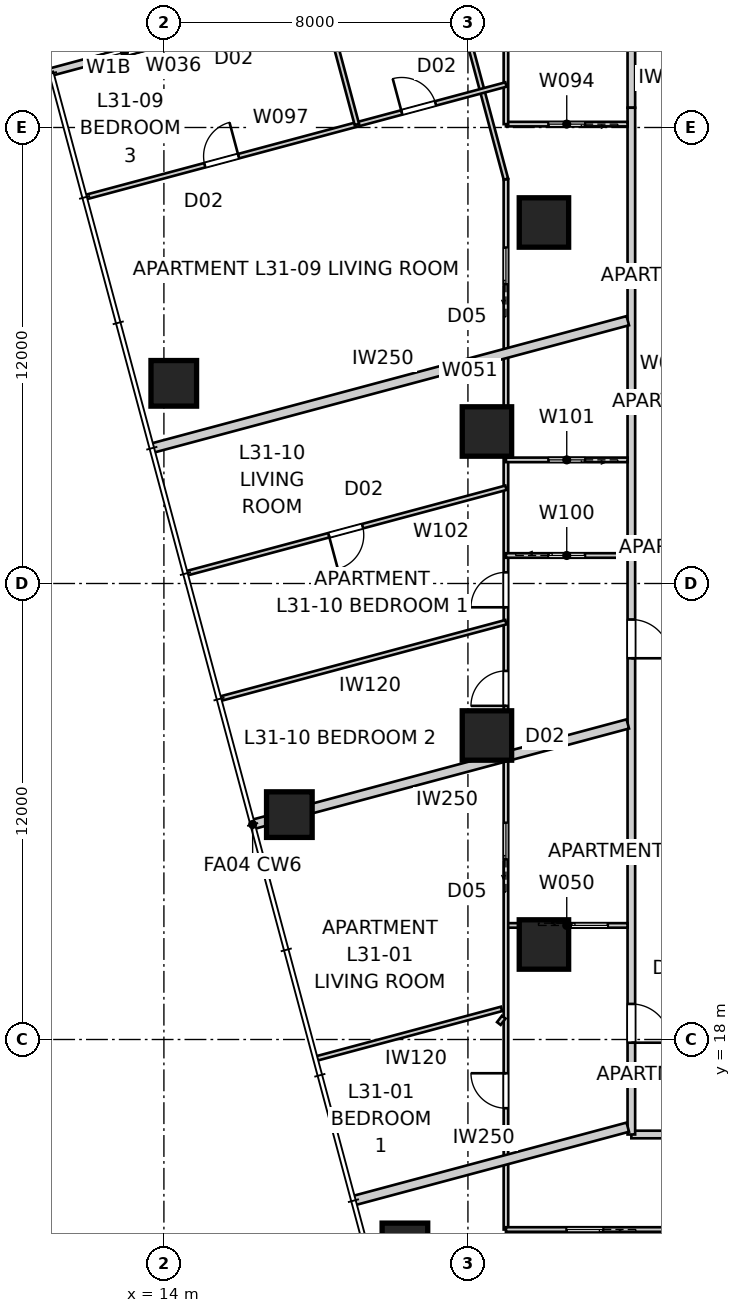
"""IFC4 building model, lengths in metres.
Left out: names, types, materials, properties, quantities, classifications, styles, units other than length and angle.
Written with IfcOpenShell. Run it as: python <this file> out.ifc"""

import sys

from ifc_helpers import new_model, si_unit, direction, frame, frame_2d, origin, origin_2d, place, context, subcontext, project, spatial, rectangle, extrude, element, fill, save


model = new_model("IFC4")
c1 = context("Model", 3, precision=1e-05, world=origin(), true_north=direction((0.0, 1.0)))
c2 = subcontext(c1, "Body", "Model", "MODEL_VIEW")
j1 = project(units=[si_unit("LENGTHUNIT", "METRE"), si_unit("PLANEANGLEUNIT", "RADIAN")], contexts=[c1])
p1 = place(None, origin())
s1 = spatial("IfcSite", under=j1, at=p1, CompositionType="ELEMENT")
p2 = place(p1, origin())
s2 = spatial("IfcBuilding", under=s1, at=p2, CompositionType="ELEMENT")
p3 = place(p2, frame((0.0, 0.0, 115.0)))
s3 = spatial("IfcBuildingStorey", under=s2, at=p3, CompositionType="ELEMENT", Elevation=115.0)
for number, where, z_axis, x_axis in (
    (1, (14.26, 35.267, 0.0), (0.0, 0.0, 1.0), (1.0, 0.0, 0.0)),
    (2, (17.301, 23.918, 0.0), (0.0, 0.0, 1.0), (1.0, 0.0, 0.0)),
    (3, (20.342, 12.568, 0.0), (0.0, 0.0, 1.0), (1.0, 0.0, 0.0)),
):
    element("IfcColumn", number, at=place(p3, frame(where, z_axis=z_axis, x_axis=x_axis)), inside=s3, PredefinedType="COLUMN", context=c2, shape_type="SweptSolid", body=[
        extrude(rectangle(XDim=1.2, YDim=1.2, at=origin_2d()), origin(), (0.0, 0.0, 1.0), 3.4),
    ])
for number, where, z_axis, x_axis in (
    (4, (24.0, 39.5, 0.0), (0.0, 0.0, 1.0), (1.0, 0.0, 0.0)),
    (5, (22.5, 34.0, 0.0), (0.0, 0.0, 1.0), (1.0, 0.0, 0.0)),
    (6, (22.5, 26.0, 0.0), (0.0, 0.0, 1.0), (1.0, 0.0, 0.0)),
    (7, (24.0, 20.5, 0.0), (0.0, 0.0, 1.0), (1.0, 0.0, 0.0)),
):
    element("IfcColumn", number, at=place(p3, frame(where, z_axis=z_axis, x_axis=x_axis)), inside=s3, PredefinedType="COLUMN", context=c2, shape_type="SweptSolid", body=[
        extrude(rectangle(XDim=1.3, YDim=1.3, at=origin_2d()), origin(), (0.0, 0.0, 1.0), 3.4),
    ])
p4 = place(p3, frame((14.893, 44.496, 0.0), z_axis=(0.0, 0.0, 1.0), x_axis=(-0.965934430412, -0.258786931944, 0.0)))
e8 = element("IfcWall", 8, at=p4, inside=s3, PredefinedType="SOLIDWALL", context=c2, shape_type="SweptSolid", body=[
    extrude(rectangle(XDim=4.0, YDim=0.2, at=frame_2d((2.0, 0.0))), origin(), (0.0, 0.0, 1.0), 3.25),
])
p5 = place(p4, frame((1.0, 0.0, 0.45)))
e9 = element("IfcOpeningElement", 9, at=p5, cuts=e8, PredefinedType="OPENING", context=c2, shape_type="SweptSolid", body=[
    extrude(rectangle(XDim=2.0, YDim=1.8, at=frame_2d((1.0, 0.9))), frame((0.0, 0.11, 0.0), z_axis=(0.0, -1.0, 0.0), x_axis=(1.0, 0.0, 0.0)), (0.0, 0.0, 1.0), 0.22),
])
p6 = place(p3, frame((26.3, 15.5, 0.0), z_axis=(0.0, 0.0, 1.0), x_axis=(1.0, 0.0, 0.0)))
e10 = element("IfcWall", 10, at=p6, inside=s3, PredefinedType="PARTITIONING", context=c2, shape_type="SweptSolid", body=[
    extrude(rectangle(XDim=28.2, YDim=0.2, at=frame_2d((14.1, 0.0))), origin(), (0.0, 0.0, 1.0), 3.25),
])
p7 = place(p6, frame((21.474, 0.0, 0.0)))
e11 = element("IfcOpeningElement", 11, at=p7, cuts=e10, PredefinedType="OPENING", context=c2, shape_type="SweptSolid", body=[
    extrude(rectangle(XDim=1.02, YDim=2.34, at=frame_2d((0.51, 1.17))), frame((0.0, 0.11, 0.0), z_axis=(0.0, -1.0, 0.0), x_axis=(1.0, 0.0, 0.0)), (0.0, 0.0, 1.0), 0.22),
])
p8 = place(p6, frame((1.353, 0.0, 0.0)))
e12 = element("IfcOpeningElement", 12, at=p8, cuts=e10, PredefinedType="OPENING", context=c2, shape_type="SweptSolid", body=[
    extrude(rectangle(XDim=1.02, YDim=2.1, at=frame_2d((0.51, 1.05))), frame((0.0, 0.11, 0.0), z_axis=(0.0, -1.0, 0.0), x_axis=(1.0, 0.0, 0.0)), (0.0, 0.0, 1.0), 0.22),
])
p9 = place(p3, frame((26.3, 44.074, 0.0), z_axis=(0.0, 0.0, 1.0), x_axis=(0.0, -1.0, 0.0)))
e13 = element("IfcWall", 13, at=p9, inside=s3, PredefinedType="PARTITIONING", context=c2, shape_type="SweptSolid", body=[
    extrude(rectangle(XDim=1.554, YDim=0.2, at=frame_2d((0.777, 0.0))), origin(), (0.0, 0.0, 1.0), 2.722),
])
p10 = place(p3, frame((26.3, 42.52, 0.0), z_axis=(0.0, 0.0, 1.0), x_axis=(0.0, -1.0, 0.0)))
e14 = element("IfcWall", 14, at=p10, inside=s3, PredefinedType="PARTITIONING", context=c2, shape_type="SweptSolid", body=[
    extrude(rectangle(XDim=27.02, YDim=0.2, at=frame_2d((13.51, 0.0))), origin(), (0.0, 0.0, 1.0), 3.25),
])
p11 = place(p10, frame((23.584, 0.0, 0.0)))
e15 = element("IfcOpeningElement", 15, at=p11, cuts=e14, PredefinedType="OPENING", context=c2, shape_type="SweptSolid", body=[
    extrude(rectangle(XDim=1.02, YDim=2.1, at=frame_2d((0.51, 1.05))), frame((0.0, 0.11, 0.0), z_axis=(0.0, -1.0, 0.0), x_axis=(1.0, 0.0, 0.0)), (0.0, 0.0, 1.0), 0.22),
])
p12 = place(p10, frame((13.468, 0.0, 0.0)))
e16 = element("IfcOpeningElement", 16, at=p12, cuts=e14, PredefinedType="OPENING", context=c2, shape_type="SweptSolid", body=[
    extrude(rectangle(XDim=1.02, YDim=2.34, at=frame_2d((0.51, 1.17))), frame((0.0, 0.11, 0.0), z_axis=(0.0, -1.0, 0.0), x_axis=(1.0, 0.0, 0.0)), (0.0, 0.0, 1.0), 0.22),
])
p13 = place(p3, frame((16.335, 23.659, 0.0), z_axis=(0.0, 0.0, 1.0), x_axis=(0.965927365002, 0.258813302479, 0.0)))
e17 = element("IfcWall", 17, at=p13, inside=s3, PredefinedType="PARTITIONING", context=c2, shape_type="SweptSolid", body=[
    extrude(rectangle(XDim=10.22, YDim=0.25, at=frame_2d((5.11, 0.0))), origin(), (0.0, 0.0, 1.0), 3.25),
])
p14 = place(p3, frame((13.682, 33.56, 0.0), z_axis=(0.0, 0.0, 1.0), x_axis=(0.965924854576, 0.258822671559, 0.0)))
e18 = element("IfcWall", 18, at=p14, inside=s3, PredefinedType="PARTITIONING", context=c2, shape_type="SweptSolid", body=[
    extrude(rectangle(XDim=12.966, YDim=0.25, at=frame_2d((6.483, 0.0))), origin(), (0.0, 0.0, 1.0), 3.25),
])
p15 = place(p3, frame((18.988, 13.758, 0.0), z_axis=(0.0, 0.0, 1.0), x_axis=(0.965929532284, 0.258805213744, 0.0)))
e19 = element("IfcWall", 19, at=p15, inside=s3, PredefinedType="PARTITIONING", context=c2, shape_type="SweptSolid", body=[
    extrude(rectangle(XDim=7.473, YDim=0.25, at=frame_2d((3.737, 0.0))), origin(), (0.0, 0.0, 1.0), 3.25),
])
p16 = place(p3, frame((23.0, 21.002, 0.0), z_axis=(0.0, 0.0, 1.0), x_axis=(1.0, 0.0, 0.0)))
e20 = element("IfcWall", 20, at=p16, inside=s3, PredefinedType="PARTITIONING", context=c2, shape_type="SweptSolid", body=[
    extrude(rectangle(XDim=3.2, YDim=0.12, at=frame_2d((1.6, 0.0))), origin(), (0.0, 0.0, 1.0), 3.25),
])
p17 = place(p16, frame((1.72, 0.0, 0.0)))
e21 = element("IfcOpeningElement", 21, at=p17, cuts=e20, PredefinedType="OPENING", context=c2, shape_type="SweptSolid", body=[
    extrude(rectangle(XDim=0.96, YDim=2.1, at=frame_2d((0.48, 1.05))), frame((0.0, 0.07, 0.0), z_axis=(0.0, -1.0, 0.0), x_axis=(1.0, 0.0, 0.0)), (0.0, 0.0, 1.0), 0.14),
])
p18 = place(p3, frame((23.0, 13.0, 0.0), z_axis=(0.0, 0.0, 1.0), x_axis=(0.0, 1.0, 0.0)))
e22 = element("IfcWall", 22, at=p18, inside=s3, PredefinedType="PARTITIONING", context=c2, shape_type="SweptSolid", body=[
    extrude(rectangle(XDim=27.64, YDim=0.12, at=frame_2d((13.82, 0.0))), origin(), (0.0, 0.0, 1.0), 2.55),
])
p19 = place(p18, frame((3.192, 0.0, 0.0)))
e23 = element("IfcOpeningElement", 23, at=p19, cuts=e22, PredefinedType="OPENING", context=c2, shape_type="SweptSolid", body=[
    extrude(rectangle(XDim=0.92, YDim=2.34, at=frame_2d((0.46, 1.17))), frame((0.0, 0.07, 0.0), z_axis=(0.0, -1.0, 0.0), x_axis=(1.0, 0.0, 0.0)), (0.0, 0.0, 1.0), 0.14),
])
p20 = place(p18, frame((13.779, 0.0, 0.0)))
e24 = element("IfcOpeningElement", 24, at=p20, cuts=e22, PredefinedType="OPENING", context=c2, shape_type="SweptSolid", body=[
    extrude(rectangle(XDim=0.92, YDim=2.34, at=frame_2d((0.46, 1.17))), frame((0.0, 0.07, 0.0), z_axis=(0.0, -1.0, 0.0), x_axis=(1.0, 0.0, 0.0)), (0.0, 0.0, 1.0), 0.14),
])
p21 = place(p18, frame((16.374, 0.0, 0.0)))
e25 = element("IfcOpeningElement", 25, at=p21, cuts=e22, PredefinedType="OPENING", context=c2, shape_type="SweptSolid", body=[
    extrude(rectangle(XDim=0.92, YDim=2.34, at=frame_2d((0.46, 1.17))), frame((0.0, 0.07, 0.0), z_axis=(0.0, -1.0, 0.0), x_axis=(1.0, 0.0, 0.0)), (0.0, 0.0, 1.0), 0.14),
])
p22 = place(p18, frame((9.743, 0.0, 0.0)))
e26 = element("IfcOpeningElement", 26, at=p22, cuts=e22, PredefinedType="OPENING", context=c2, shape_type="SweptSolid", body=[
    extrude(rectangle(XDim=0.96, YDim=2.1, at=frame_2d((0.48, 1.05))), frame((0.0, 0.07, 0.0), z_axis=(0.0, -1.0, 0.0), x_axis=(1.0, 0.0, 0.0)), (0.0, 0.0, 1.0), 0.14),
])
p23 = place(p18, frame((24.879, 0.0, 0.0)))
e27 = element("IfcOpeningElement", 27, at=p23, cuts=e22, PredefinedType="OPENING", context=c2, shape_type="SweptSolid", body=[
    extrude(rectangle(XDim=0.96, YDim=2.1, at=frame_2d((0.48, 1.05))), frame((0.0, 0.07, 0.0), z_axis=(0.0, -1.0, 0.0), x_axis=(1.0, 0.0, 0.0)), (0.0, 0.0, 1.0), 0.14),
])
p24 = place(p3, frame((22.813, 18.42, 0.0), z_axis=(0.0, 0.0, 1.0), x_axis=(0.609039064162, 0.793140226142, 0.0)))
e28 = element("IfcWall", 28, at=p24, inside=s3, PredefinedType="PARTITIONING", context=c2, shape_type="SweptSolid", body=[
    extrude(rectangle(XDim=0.211, YDim=0.12, at=frame_2d((0.105, 0.0))), origin(), (0.0, 0.0, 1.0), 3.25),
])
p25 = place(p3, frame((22.884, 18.805, 0.0), z_axis=(0.0, 0.0, 1.0), x_axis=(-0.965921615375, -0.258834759935, 0.0)))
e29 = element("IfcWall", 29, at=p25, inside=s3, PredefinedType="PARTITIONING", context=c2, shape_type="SweptSolid", body=[
    extrude(rectangle(XDim=5.029, YDim=0.12, at=frame_2d((2.515, 0.0))), origin(), (0.0, 0.0, 1.0), 2.722),
])
p26 = place(p3, frame((29.147, 13.0, 0.0), z_axis=(0.0, 0.0, 1.0), x_axis=(-1.0, 0.0, 0.0)))
e30 = element("IfcWall", 30, at=p26, inside=s3, PredefinedType="PARTITIONING", context=c2, shape_type="SweptSolid", body=[
    extrude(rectangle(XDim=6.147, YDim=0.12, at=frame_2d((3.074, 0.0))), origin(), (0.0, 0.0, 1.0), 3.25),
])
p27 = place(p26, frame((3.591, 0.0, 0.0)))
e31 = element("IfcOpeningElement", 31, at=p27, cuts=e30, PredefinedType="OPENING", context=c2, shape_type="SweptSolid", body=[
    extrude(rectangle(XDim=0.96, YDim=2.1, at=frame_2d((0.48, 1.05))), frame((0.0, 0.07, 0.0), z_axis=(0.0, -1.0, 0.0), x_axis=(1.0, 0.0, 0.0)), (0.0, 0.0, 1.0), 0.14),
])
p28 = place(p3, frame((19.911, 10.468, 0.0), z_axis=(0.0, 0.0, 1.0), x_axis=(0.965927203676, 0.25881390457, 0.0)))
e32 = element("IfcWall", 32, at=p28, inside=s3, PredefinedType="PARTITIONING", context=c2, shape_type="SweptSolid", body=[
    extrude(rectangle(XDim=9.357, YDim=0.12, at=frame_2d((4.678, 0.0))), origin(), (0.0, 0.0, 1.0), 2.638),
])
p29 = place(p28, frame((4.391, 0.0, 0.0)))
e33 = element("IfcOpeningElement", 33, at=p29, cuts=e32, PredefinedType="OPENING", context=c2, shape_type="SweptSolid", body=[
    extrude(rectangle(XDim=0.96, YDim=2.1, at=frame_2d((0.48, 1.05))), frame((0.0, 0.07, 0.0), z_axis=(0.0, -1.0, 0.0), x_axis=(1.0, 0.0, 0.0)), (0.0, 0.0, 1.0), 0.14),
])
p30 = place(p3, frame((26.2, 42.089, 0.0), z_axis=(0.0, 0.0, 1.0), x_axis=(-1.0, 0.0, 0.0)))
e34 = element("IfcWall", 34, at=p30, inside=s3, PredefinedType="PARTITIONING", context=c2, shape_type="SweptSolid", body=[
    extrude(rectangle(XDim=3.2, YDim=0.12, at=frame_2d((1.6, 0.0))), origin(), (0.0, 0.0, 1.0), 3.25),
])
p31 = place(p30, frame((1.12, 0.0, 0.0)))
e35 = element("IfcOpeningElement", 35, at=p31, cuts=e34, PredefinedType="OPENING", context=c2, shape_type="SweptSolid", body=[
    extrude(rectangle(XDim=0.96, YDim=2.1, at=frame_2d((0.48, 1.05))), frame((0.0, 0.07, 0.0), z_axis=(0.0, -1.0, 0.0), x_axis=(1.0, 0.0, 0.0)), (0.0, 0.0, 1.0), 0.14),
])
p32 = place(p3, frame((23.0, 42.089, 0.0), z_axis=(0.0, 0.0, 1.0), x_axis=(0.0, 1.0, 0.0)))
e36 = element("IfcWall", 36, at=p32, inside=s3, PredefinedType="PARTITIONING", context=c2, shape_type="SweptSolid", body=[
    extrude(rectangle(XDim=4.911, YDim=0.12, at=frame_2d((2.456, 0.0))), origin(), (0.0, 0.0, 1.0), 3.25),
])
p33 = place(p3, frame((23.0, 40.64, 0.0), z_axis=(0.0, 0.0, 1.0), x_axis=(-0.258790139317, 0.965933571108, 0.0)))
e37 = element("IfcWall", 37, at=p33, inside=s3, PredefinedType="PARTITIONING", context=c2, shape_type="SweptSolid", body=[
    extrude(rectangle(XDim=9.783, YDim=0.12, at=frame_2d((4.892, 0.0))), origin(), (0.0, 0.0, 1.0), 2.638),
])
p34 = place(p3, frame((11.952, 40.17, 0.0), z_axis=(0.0, 0.0, 1.0), x_axis=(0.965923183761, 0.258828906952, 0.0)))
e38 = element("IfcWall", 38, at=p34, inside=s3, PredefinedType="PARTITIONING", context=c2, shape_type="SweptSolid", body=[
    extrude(rectangle(XDim=11.438, YDim=0.12, at=frame_2d((5.719, 0.0))), origin(), (0.0, 0.0, 1.0), 3.25),
])
p35 = place(p34, frame((3.233, 0.0, 0.0)))
e39 = element("IfcOpeningElement", 39, at=p35, cuts=e38, PredefinedType="OPENING", context=c2, shape_type="SweptSolid", body=[
    extrude(rectangle(XDim=0.92, YDim=2.34, at=frame_2d((0.46, 1.17))), frame((0.0, 0.07, 0.0), z_axis=(0.0, -1.0, 0.0), x_axis=(1.0, 0.0, 0.0)), (0.0, 0.0, 1.0), 0.14),
])
p36 = place(p34, frame((8.6, 0.0, 0.0)))
e40 = element("IfcOpeningElement", 40, at=p36, cuts=e38, PredefinedType="OPENING", context=c2, shape_type="SweptSolid", body=[
    extrude(rectangle(XDim=0.92, YDim=2.34, at=frame_2d((0.46, 1.17))), frame((0.0, 0.07, 0.0), z_axis=(0.0, -1.0, 0.0), x_axis=(1.0, 0.0, 0.0)), (0.0, 0.0, 1.0), 0.14),
])
p37 = place(p3, frame((19.077, 42.08, 0.0), z_axis=(0.0, 0.0, 1.0), x_axis=(-0.258846923464, 0.965918355874, 0.0)))
e41 = element("IfcWall", 41, at=p37, inside=s3, PredefinedType="PARTITIONING", context=c2, shape_type="SweptSolid", body=[
    extrude(rectangle(XDim=7.377, YDim=0.12, at=frame_2d((3.688, 0.0))), origin(), (0.0, 0.0, 1.0), 3.25),
])
p38 = place(p3, frame((23.0, 30.737, 0.0), z_axis=(0.0, 0.0, 1.0), x_axis=(1.0, 0.0, 0.0)))
e42 = element("IfcWall", 42, at=p38, inside=s3, PredefinedType="PARTITIONING", context=c2, shape_type="SweptSolid", body=[
    extrude(rectangle(XDim=3.2, YDim=0.12, at=frame_2d((1.6, 0.0))), origin(), (0.0, 0.0, 1.0), 3.25),
])
p39 = place(p38, frame((1.12, 0.0, 0.0)))
e43 = element("IfcOpeningElement", 43, at=p39, cuts=e42, PredefinedType="OPENING", context=c2, shape_type="SweptSolid", body=[
    extrude(rectangle(XDim=0.96, YDim=2.1, at=frame_2d((0.48, 1.05))), frame((0.0, 0.07, 0.0), z_axis=(0.0, -1.0, 0.0), x_axis=(1.0, 0.0, 0.0)), (0.0, 0.0, 1.0), 0.14),
])
p40 = place(p3, frame((26.2, 33.253, 0.0), z_axis=(0.0, 0.0, 1.0), x_axis=(-1.0, 0.0, 0.0)))
e44 = element("IfcWall", 44, at=p40, inside=s3, PredefinedType="PARTITIONING", context=c2, shape_type="SweptSolid", body=[
    extrude(rectangle(XDim=3.2, YDim=0.12, at=frame_2d((1.6, 0.0))), origin(), (0.0, 0.0, 1.0), 3.25),
])
p41 = place(p40, frame((1.12, 0.0, 0.0)))
e45 = element("IfcOpeningElement", 45, at=p41, cuts=e44, PredefinedType="OPENING", context=c2, shape_type="SweptSolid", body=[
    extrude(rectangle(XDim=0.96, YDim=2.1, at=frame_2d((0.48, 1.05))), frame((0.0, 0.07, 0.0), z_axis=(0.0, -1.0, 0.0), x_axis=(1.0, 0.0, 0.0)), (0.0, 0.0, 1.0), 0.14),
])
p42 = place(p3, frame((23.0, 32.519, 0.0), z_axis=(0.0, 0.0, 1.0), x_axis=(-0.965925607751, -0.258819860698, 0.0)))
e46 = element("IfcWall", 46, at=p42, inside=s3, PredefinedType="PARTITIONING", context=c2, shape_type="SweptSolid", body=[
    extrude(rectangle(XDim=8.691, YDim=0.12, at=frame_2d((4.346, 0.0))), origin(), (0.0, 0.0, 1.0), 3.25),
])
p43 = place(p42, frame((3.906, 0.0, 0.0)))
e47 = element("IfcOpeningElement", 47, at=p43, cuts=e46, PredefinedType="OPENING", context=c2, shape_type="SweptSolid", body=[
    extrude(rectangle(XDim=0.92, YDim=2.34, at=frame_2d((0.46, 1.17))), frame((0.0, 0.07, 0.0), z_axis=(0.0, -1.0, 0.0), x_axis=(1.0, 0.0, 0.0)), (0.0, 0.0, 1.0), 0.14),
])
p44 = place(p3, frame((23.0, 28.982, 0.0), z_axis=(0.0, 0.0, 1.0), x_axis=(-0.965927309482, -0.258813509689, 0.0)))
e48 = element("IfcWall", 48, at=p44, inside=s3, PredefinedType="PARTITIONING", context=c2, shape_type="SweptSolid", body=[
    extrude(rectangle(XDim=7.776, YDim=0.12, at=frame_2d((3.888, 0.0))), origin(), (0.0, 0.0, 1.0), 3.25),
])
p45 = place(p5, origin())
e49 = element("IfcWindow", 49, at=p45, inside=s3, PartitioningType="SINGLE_PANEL", PredefinedType="WINDOW", context=c2, shape_type="SweptSolid", body=[
    extrude(rectangle(XDim=2.0, YDim=1.8, at=frame_2d((1.0, 0.9))), frame((0.0, 0.03, 0.0), z_axis=(0.0, -1.0, 0.0), x_axis=(1.0, 0.0, 0.0)), (0.0, 0.0, 1.0), 0.06),
])
fill(e9, e49)
p46 = place(p11, origin())
e50 = element("IfcDoor", 50, at=p46, inside=s3, OperationType="SINGLE_SWING_RIGHT", PredefinedType="DOOR", context=c2, shape_type="SweptSolid", body=[
    extrude(rectangle(XDim=1.02, YDim=2.1, at=frame_2d((0.51, 1.05))), frame((0.0, 0.025, 0.0), z_axis=(0.0, -1.0, 0.0), x_axis=(1.0, 0.0, 0.0)), (0.0, 0.0, 1.0), 0.05),
])
fill(e15, e50)
p47 = place(p12, origin())
e51 = element("IfcDoor", 51, at=p47, inside=s3, OperationType="SINGLE_SWING_RIGHT", PredefinedType="DOOR", context=c2, shape_type="SweptSolid", body=[
    extrude(rectangle(XDim=1.02, YDim=2.34, at=frame_2d((0.51, 1.17))), frame((0.0, 0.025, 0.0), z_axis=(0.0, -1.0, 0.0), x_axis=(1.0, 0.0, 0.0)), (0.0, 0.0, 1.0), 0.05),
])
fill(e16, e51)
p48 = place(p19, origin())
e52 = element("IfcDoor", 52, at=p48, inside=s3, OperationType="SINGLE_SWING_RIGHT", PredefinedType="DOOR", context=c2, shape_type="SweptSolid", body=[
    extrude(rectangle(XDim=0.92, YDim=2.34, at=frame_2d((0.46, 1.17))), frame((0.0, 0.025, 0.0), z_axis=(0.0, -1.0, 0.0), x_axis=(1.0, 0.0, 0.0)), (0.0, 0.0, 1.0), 0.05),
])
fill(e23, e52)
p49 = place(p17, origin())
e53 = element("IfcDoor", 53, at=p49, inside=s3, OperationType="SLIDING_TO_LEFT", PredefinedType="DOOR", context=c2, shape_type="SweptSolid", body=[
    extrude(rectangle(XDim=0.96, YDim=2.1, at=frame_2d((0.48, 1.05))), frame((0.0, 0.025, 0.0), z_axis=(0.0, -1.0, 0.0), x_axis=(1.0, 0.0, 0.0)), (0.0, 0.0, 1.0), 0.05),
])
fill(e21, e53)
p50 = place(p20, origin())
e54 = element("IfcDoor", 54, at=p50, inside=s3, OperationType="SINGLE_SWING_LEFT", PredefinedType="DOOR", context=c2, shape_type="SweptSolid", body=[
    extrude(rectangle(XDim=0.92, YDim=2.34, at=frame_2d((0.46, 1.17))), frame((0.0, 0.025, 0.0), z_axis=(0.0, -1.0, 0.0), x_axis=(1.0, 0.0, 0.0)), (0.0, 0.0, 1.0), 0.05),
])
fill(e24, e54)
p51 = place(p39, origin())
e55 = element("IfcDoor", 55, at=p51, inside=s3, OperationType="SLIDING_TO_LEFT", PredefinedType="DOOR", context=c2, shape_type="SweptSolid", body=[
    extrude(rectangle(XDim=0.96, YDim=2.1, at=frame_2d((0.48, 1.05))), frame((0.0, 0.025, 0.0), z_axis=(0.0, -1.0, 0.0), x_axis=(1.0, 0.0, 0.0)), (0.0, 0.0, 1.0), 0.05),
])
fill(e43, e55)
p52 = place(p21, origin())
e56 = element("IfcDoor", 56, at=p52, inside=s3, OperationType="SINGLE_SWING_LEFT", PredefinedType="DOOR", context=c2, shape_type="SweptSolid", body=[
    extrude(rectangle(XDim=0.92, YDim=2.34, at=frame_2d((0.46, 1.17))), frame((0.0, 0.025, 0.0), z_axis=(0.0, -1.0, 0.0), x_axis=(1.0, 0.0, 0.0)), (0.0, 0.0, 1.0), 0.05),
])
fill(e25, e56)
p53 = place(p27, origin())
e57 = element("IfcDoor", 57, at=p53, inside=s3, OperationType="SLIDING_TO_LEFT", PredefinedType="DOOR", context=c2, shape_type="SweptSolid", body=[
    extrude(rectangle(XDim=0.96, YDim=2.1, at=frame_2d((0.48, 1.05))), frame((0.0, 0.025, 0.0), z_axis=(0.0, -1.0, 0.0), x_axis=(1.0, 0.0, 0.0)), (0.0, 0.0, 1.0), 0.05),
])
fill(e31, e57)
p54 = place(p31, origin())
e58 = element("IfcDoor", 58, at=p54, inside=s3, OperationType="SLIDING_TO_LEFT", PredefinedType="DOOR", context=c2, shape_type="SweptSolid", body=[
    extrude(rectangle(XDim=0.96, YDim=2.1, at=frame_2d((0.48, 1.05))), frame((0.0, 0.025, 0.0), z_axis=(0.0, -1.0, 0.0), x_axis=(1.0, 0.0, 0.0)), (0.0, 0.0, 1.0), 0.05),
])
fill(e35, e58)
p55 = place(p22, origin())
e59 = element("IfcDoor", 59, at=p55, inside=s3, OperationType="SLIDING_TO_LEFT", PredefinedType="DOOR", context=c2, shape_type="SweptSolid", body=[
    extrude(rectangle(XDim=0.96, YDim=2.1, at=frame_2d((0.48, 1.05))), frame((0.0, 0.025, 0.0), z_axis=(0.0, -1.0, 0.0), x_axis=(1.0, 0.0, 0.0)), (0.0, 0.0, 1.0), 0.05),
])
fill(e26, e59)
p56 = place(p41, origin())
e60 = element("IfcDoor", 60, at=p56, inside=s3, OperationType="SLIDING_TO_LEFT", PredefinedType="DOOR", context=c2, shape_type="SweptSolid", body=[
    extrude(rectangle(XDim=0.96, YDim=2.1, at=frame_2d((0.48, 1.05))), frame((0.0, 0.025, 0.0), z_axis=(0.0, -1.0, 0.0), x_axis=(1.0, 0.0, 0.0)), (0.0, 0.0, 1.0), 0.05),
])
fill(e45, e60)
p57 = place(p23, origin())
e61 = element("IfcDoor", 61, at=p57, inside=s3, OperationType="SLIDING_TO_LEFT", PredefinedType="DOOR", context=c2, shape_type="SweptSolid", body=[
    extrude(rectangle(XDim=0.96, YDim=2.1, at=frame_2d((0.48, 1.05))), frame((0.0, 0.025, 0.0), z_axis=(0.0, -1.0, 0.0), x_axis=(1.0, 0.0, 0.0)), (0.0, 0.0, 1.0), 0.05),
])
fill(e27, e61)
p58 = place(p35, origin())
e62 = element("IfcDoor", 62, at=p58, inside=s3, OperationType="SINGLE_SWING_RIGHT", PredefinedType="DOOR", context=c2, shape_type="SweptSolid", body=[
    extrude(rectangle(XDim=0.92, YDim=2.34, at=frame_2d((0.46, 1.17))), frame((0.0, 0.025, 0.0), z_axis=(0.0, -1.0, 0.0), x_axis=(1.0, 0.0, 0.0)), (0.0, 0.0, 1.0), 0.05),
])
fill(e39, e62)
p59 = place(p36, origin())
e63 = element("IfcDoor", 63, at=p59, inside=s3, OperationType="SINGLE_SWING_LEFT", PredefinedType="DOOR", context=c2, shape_type="SweptSolid", body=[
    extrude(rectangle(XDim=0.92, YDim=2.34, at=frame_2d((0.46, 1.17))), frame((0.0, 0.025, 0.0), z_axis=(0.0, -1.0, 0.0), x_axis=(1.0, 0.0, 0.0)), (0.0, 0.0, 1.0), 0.05),
])
fill(e40, e63)
p60 = place(p43, origin())
e64 = element("IfcDoor", 64, at=p60, inside=s3, OperationType="SINGLE_SWING_RIGHT", PredefinedType="DOOR", context=c2, shape_type="SweptSolid", body=[
    extrude(rectangle(XDim=0.92, YDim=2.34, at=frame_2d((0.46, 1.17))), frame((0.0, 0.025, 0.0), z_axis=(0.0, -1.0, 0.0), x_axis=(1.0, 0.0, 0.0)), (0.0, 0.0, 1.0), 0.05),
])
fill(e47, e64)
save(model, sys.argv[1])
